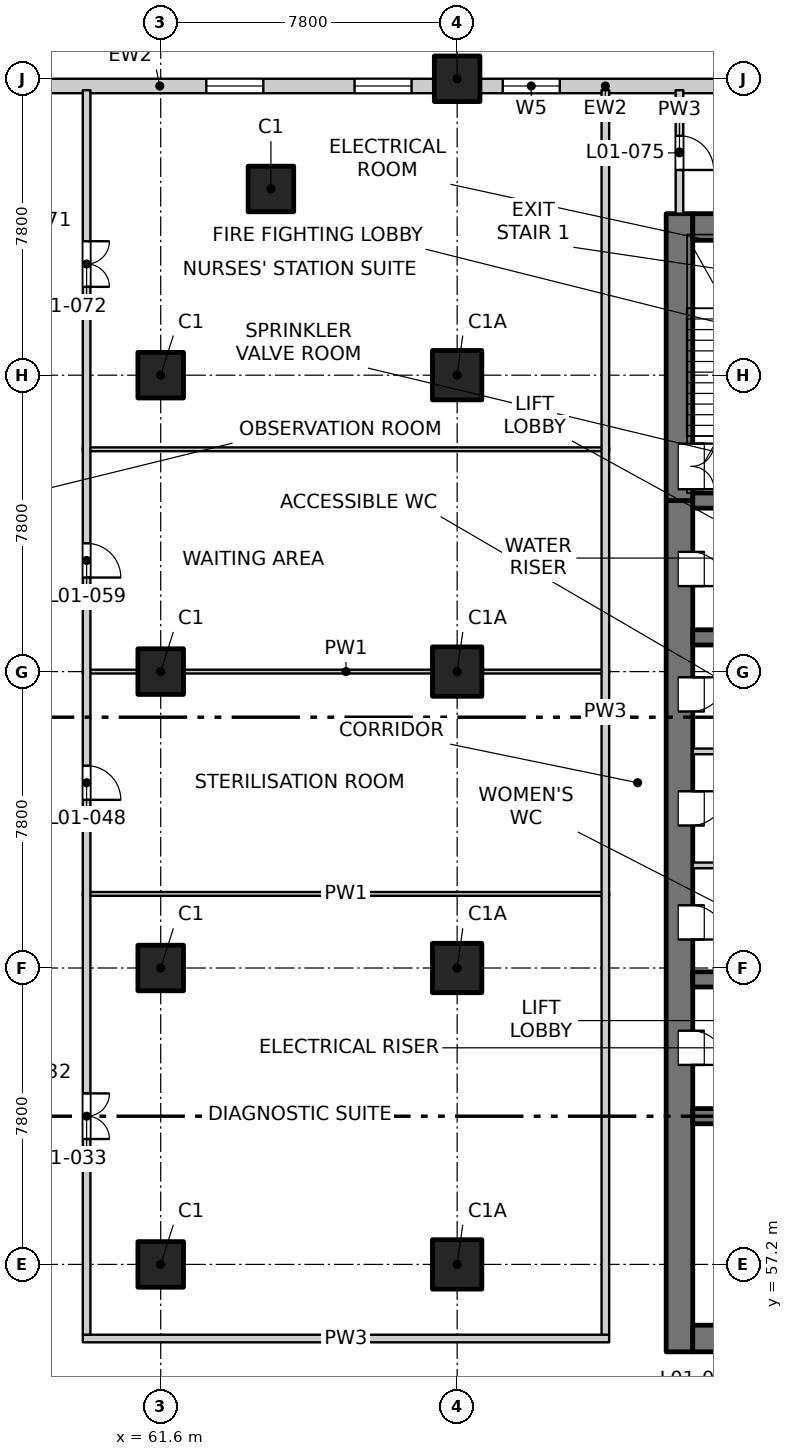
"""IFC4 building model, lengths in metres.
Left out: names, types, materials, properties, quantities, classifications, styles, units other than length and angle.
Written with IfcOpenShell. Run it as: python <this file> out.ifc"""

import sys

from ifc_helpers import new_model, si_unit, direction, frame, frame_2d, origin, origin_2d, place, context, subcontext, project, spatial, rectangle, extrude, element, fill, save


model = new_model("IFC4")
c1 = context("Model", 3, precision=1e-05, world=origin(), true_north=direction((0.0, 1.0)))
c2 = subcontext(c1, "Body", "Model", "MODEL_VIEW")
j1 = project(units=[si_unit("LENGTHUNIT", "METRE"), si_unit("PLANEANGLEUNIT", "RADIAN")], contexts=[c1])
p1 = place(None, origin())
s1 = spatial("IfcSite", under=j1, at=p1, CompositionType="ELEMENT")
p2 = place(p1, origin())
s2 = spatial("IfcBuilding", under=s1, at=p2, CompositionType="ELEMENT")
p3 = place(p2, frame((0.0, 0.0, 6.0)))
s3 = spatial("IfcBuildingStorey", under=s2, at=p3, CompositionType="ELEMENT", Elevation=6.0)
for number, where, z_axis, x_axis in (
    (1, (64.5, 85.5, -0.3), (0.0, 0.0, 1.0), (1.0, 0.0, 0.0)),
    (2, (69.4, 88.4, -0.3), (0.0, 0.0, 1.0), (1.0, 0.0, 0.0)),
    (3, (61.6, 57.2, -0.3), (0.0, 0.0, 1.0), (1.0, 0.0, 0.0)),
    (4, (61.6, 65.0, -0.3), (0.0, 0.0, 1.0), (1.0, 0.0, 0.0)),
    (5, (61.6, 72.8, -0.3), (0.0, 0.0, 1.0), (1.0, 0.0, 0.0)),
    (6, (61.6, 80.6, -0.3), (0.0, 0.0, 1.0), (1.0, 0.0, 0.0)),
):
    element("IfcColumn", number, at=place(p3, frame(where, z_axis=z_axis, x_axis=x_axis)), inside=s3, PredefinedType="COLUMN", context=c2, shape_type="SweptSolid", body=[
        extrude(rectangle(XDim=1.2, YDim=1.2, at=origin_2d()), origin(), (0.0, 0.0, 1.0), 4.5),
    ])
for number, where, z_axis, x_axis in (
    (7, (69.4, 57.2, -0.3), (0.0, 0.0, 1.0), (1.0, 0.0, 0.0)),
    (8, (69.4, 65.0, -0.3), (0.0, 0.0, 1.0), (1.0, 0.0, 0.0)),
    (9, (69.4, 72.8, -0.3), (0.0, 0.0, 1.0), (1.0, 0.0, 0.0)),
    (10, (69.4, 80.6, -0.3), (0.0, 0.0, 1.0), (1.0, 0.0, 0.0)),
):
    element("IfcColumn", number, at=place(p3, frame(where, z_axis=z_axis, x_axis=x_axis)), inside=s3, PredefinedType="COLUMN", context=c2, shape_type="SweptSolid", body=[
        extrude(rectangle(XDim=1.3, YDim=1.3, at=origin_2d()), origin(), (0.0, 0.0, 1.0), 4.5),
    ])
p4 = place(p3, frame((75.25, 54.9, -0.3), z_axis=(0.0, 0.0, 1.0), x_axis=(0.0, 1.0, 0.0)))
e11 = element("IfcWall", 11, at=p4, inside=s3, PredefinedType="SOLIDWALL", context=c2, shape_type="SweptSolid", body=[
    extrude(rectangle(XDim=22.4, YDim=0.7, at=frame_2d((11.2, 0.0))), origin(), (0.0, 0.0, 1.0), 4.5),
])
p5 = place(p4, frame((7.55, 0.0, 0.3)))
e12 = element("IfcOpeningElement", 12, at=p5, cuts=e11, PredefinedType="OPENING", context=c2, shape_type="SweptSolid", body=[
    extrude(rectangle(XDim=0.9, YDim=2.1, at=frame_2d((0.45, 1.05))), frame((0.0, 0.36, 0.0), z_axis=(0.0, -1.0, 0.0), x_axis=(1.0, 0.0, 0.0)), (0.0, 0.0, 1.0), 0.72),
])
p6 = place(p4, frame((10.85, 0.0, 0.3)))
e13 = element("IfcOpeningElement", 13, at=p6, cuts=e11, PredefinedType="OPENING", context=c2, shape_type="SweptSolid", body=[
    extrude(rectangle(XDim=0.9, YDim=2.1, at=frame_2d((0.45, 1.05))), frame((0.0, 0.36, 0.0), z_axis=(0.0, -1.0, 0.0), x_axis=(1.0, 0.0, 0.0)), (0.0, 0.0, 1.0), 0.72),
])
p7 = place(p4, frame((13.85, 0.0, 0.3)))
e14 = element("IfcOpeningElement", 14, at=p7, cuts=e11, PredefinedType="OPENING", context=c2, shape_type="SweptSolid", body=[
    extrude(rectangle(XDim=0.9, YDim=2.1, at=frame_2d((0.45, 1.05))), frame((0.0, 0.36, 0.0), z_axis=(0.0, -1.0, 0.0), x_axis=(1.0, 0.0, 0.0)), (0.0, 0.0, 1.0), 0.72),
])
p8 = place(p4, frame((16.85, 0.0, 0.3)))
e15 = element("IfcOpeningElement", 15, at=p8, cuts=e11, PredefinedType="OPENING", context=c2, shape_type="SweptSolid", body=[
    extrude(rectangle(XDim=0.9, YDim=2.1, at=frame_2d((0.45, 1.05))), frame((0.0, 0.36, 0.0), z_axis=(0.0, -1.0, 0.0), x_axis=(1.0, 0.0, 0.0)), (0.0, 0.0, 1.0), 0.72),
])
p9 = place(p4, frame((20.15, 0.0, 0.3)))
e16 = element("IfcOpeningElement", 16, at=p9, cuts=e11, PredefinedType="OPENING", context=c2, shape_type="SweptSolid", body=[
    extrude(rectangle(XDim=0.9, YDim=2.1, at=frame_2d((0.45, 1.05))), frame((0.0, 0.36, 0.0), z_axis=(0.0, -1.0, 0.0), x_axis=(1.0, 0.0, 0.0)), (0.0, 0.0, 1.0), 0.72),
])
p10 = place(p3, frame((75.25, 77.3, -0.3), z_axis=(0.0, 0.0, 1.0), x_axis=(0.0, 1.0, 0.0)))
e17 = element("IfcWall", 17, at=p10, inside=s3, PredefinedType="SOLIDWALL", context=c2, shape_type="SweptSolid", body=[
    extrude(rectangle(XDim=7.55, YDim=0.7, at=frame_2d((3.775, 0.0))), origin(), (0.0, 0.0, 1.0), 4.5),
])
p11 = place(p10, frame((0.3, 0.0, 0.3)))
e18 = element("IfcOpeningElement", 18, at=p11, cuts=e17, PredefinedType="OPENING", context=c2, shape_type="SweptSolid", body=[
    extrude(rectangle(XDim=1.2, YDim=2.1, at=frame_2d((0.6, 1.05))), frame((0.0, 0.36, 0.0), z_axis=(0.0, -1.0, 0.0), x_axis=(1.0, 0.0, 0.0)), (0.0, 0.0, 1.0), 0.72),
])
p12 = place(p3, frame((75.6, 55.25, -0.3), z_axis=(0.0, 0.0, 1.0), x_axis=(1.0, 0.0, 0.0)))
e19 = element("IfcWall", 19, at=p12, inside=s3, PredefinedType="SOLIDWALL", context=c2, shape_type="SweptSolid", body=[
    extrude(rectangle(XDim=18.8, YDim=0.7, at=frame_2d((9.4, 0.0))), origin(), (0.0, 0.0, 1.0), 4.5),
])
p13 = place(p12, frame((8.65, 0.0, 0.3)))
e20 = element("IfcOpeningElement", 20, at=p13, cuts=e19, PredefinedType="OPENING", context=c2, shape_type="SweptSolid", body=[
    extrude(rectangle(XDim=1.5, YDim=2.1, at=frame_2d((0.75, 1.05))), frame((0.0, 0.36, 0.0), z_axis=(0.0, -1.0, 0.0), x_axis=(1.0, 0.0, 0.0)), (0.0, 0.0, 1.0), 0.72),
])
p14 = place(p3, frame((75.6, 84.5, -0.3), z_axis=(0.0, 0.0, 1.0), x_axis=(1.0, 0.0, 0.0)))
e21 = element("IfcWall", 21, at=p14, inside=s3, PredefinedType="SOLIDWALL", context=c2, shape_type="SweptSolid", body=[
    extrude(rectangle(XDim=18.8, YDim=0.7, at=frame_2d((9.4, 0.0))), origin(), (0.0, 0.0, 1.0), 4.5),
])
for number, where, z_axis, x_axis in (
    (22, (75.6, 61.1, -0.3), (0.0, 0.0, 1.0), (1.0, 0.0, 0.0)),
    (23, (75.6, 64.7, -0.3), (0.0, 0.0, 1.0), (1.0, 0.0, 0.0)),
    (24, (75.6, 73.7, -0.3), (0.0, 0.0, 1.0), (1.0, 0.0, 0.0)),
    (25, (75.6, 77.3, -0.3), (0.0, 0.0, 1.0), (1.0, 0.0, 0.0)),
):
    element("IfcWall", number, at=place(p3, frame(where, z_axis=z_axis, x_axis=x_axis)), inside=s3, PredefinedType="SOLIDWALL", context=c2, shape_type="SweptSolid", body=[
        extrude(rectangle(XDim=3.65, YDim=0.4, at=frame_2d((1.825, 0.0))), origin(), (0.0, 0.0, 1.0), 4.5),
    ])
p15 = place(p3, frame((54.35, 88.21, 0.0), z_axis=(0.0, 0.0, 1.0), x_axis=(1.0, 0.0, 0.0)))
e26 = element("IfcWall", 26, at=p15, inside=s3, PredefinedType="SOLIDWALL", context=c2, shape_type="SweptSolid", body=[
    extrude(rectangle(XDim=14.45, YDim=0.38, at=frame_2d((7.225, 0.0))), origin(), (0.0, 0.0, 1.0), 4.2),
])
p16 = place(p15, frame((0.65, 0.0, 0.9)))
e27 = element("IfcOpeningElement", 27, at=p16, cuts=e26, PredefinedType="OPENING", context=c2, shape_type="SweptSolid", body=[
    extrude(rectangle(XDim=1.5, YDim=1.5, at=frame_2d((0.75, 0.75))), frame((0.0, 0.2, 0.0), z_axis=(0.0, -1.0, 0.0), x_axis=(1.0, 0.0, 0.0)), (0.0, 0.0, 1.0), 0.4),
])
p17 = place(p15, frame((8.45, 0.0, 0.9)))
e28 = element("IfcOpeningElement", 28, at=p17, cuts=e26, PredefinedType="OPENING", context=c2, shape_type="SweptSolid", body=[
    extrude(rectangle(XDim=1.5, YDim=1.5, at=frame_2d((0.75, 0.75))), frame((0.0, 0.2, 0.0), z_axis=(0.0, -1.0, 0.0), x_axis=(1.0, 0.0, 0.0)), (0.0, 0.0, 1.0), 0.4),
])
p18 = place(p15, frame((12.35, 0.0, 0.9)))
e29 = element("IfcOpeningElement", 29, at=p18, cuts=e26, PredefinedType="OPENING", context=c2, shape_type="SweptSolid", body=[
    extrude(rectangle(XDim=1.5, YDim=1.5, at=frame_2d((0.75, 0.75))), frame((0.0, 0.2, 0.0), z_axis=(0.0, -1.0, 0.0), x_axis=(1.0, 0.0, 0.0)), (0.0, 0.0, 1.0), 0.4),
])
p19 = place(p3, frame((70.0, 88.21, 0.0), z_axis=(0.0, 0.0, 1.0), x_axis=(1.0, 0.0, 0.0)))
e30 = element("IfcWall", 30, at=p19, inside=s3, PredefinedType="SOLIDWALL", context=c2, shape_type="SweptSolid", body=[
    extrude(rectangle(XDim=6.6, YDim=0.38, at=frame_2d((3.3, 0.0))), origin(), (0.0, 0.0, 1.0), 4.2),
])
p20 = place(p19, frame((0.6, 0.0, 0.9)))
e31 = element("IfcOpeningElement", 31, at=p20, cuts=e30, PredefinedType="OPENING", context=c2, shape_type="SweptSolid", body=[
    extrude(rectangle(XDim=1.5, YDim=1.5, at=frame_2d((0.75, 0.75))), frame((0.0, 0.2, 0.0), z_axis=(0.0, -1.0, 0.0), x_axis=(1.0, 0.0, 0.0)), (0.0, 0.0, 1.0), 0.4),
])
p21 = place(p3, frame((59.55, 55.25, 0.0), z_axis=(0.0, 0.0, 1.0), x_axis=(1.0, 0.0, 0.0)))
e32 = element("IfcWall", 32, at=p21, inside=s3, PredefinedType="PARTITIONING", context=c2, shape_type="SweptSolid", body=[
    extrude(rectangle(XDim=13.85, YDim=0.2, at=frame_2d((6.925, 0.0))), origin(), (0.0, 0.0, 1.0), 4.2),
])
p22 = place(p3, frame((59.55, 66.95, 0.0), z_axis=(0.0, 0.0, 1.0), x_axis=(1.0, 0.0, 0.0)))
e33 = element("IfcWall", 33, at=p22, inside=s3, PredefinedType="PARTITIONING", context=c2, shape_type="SweptSolid", body=[
    extrude(rectangle(XDim=13.85, YDim=0.1, at=frame_2d((6.925, 0.0))), origin(), (0.0, 0.0, 1.0), 4.2),
])
for number, where, z_axis, x_axis in (
    (34, (75.6, 67.7, 0.0), (0.0, 0.0, 1.0), (1.0, 0.0, 0.0)),
    (35, (75.6, 70.7, 0.0), (0.0, 0.0, 1.0), (1.0, 0.0, 0.0)),
):
    element("IfcWall", number, at=place(p3, frame(where, z_axis=z_axis, x_axis=x_axis)), inside=s3, PredefinedType="PARTITIONING", context=c2, shape_type="SweptSolid", body=[
        extrude(rectangle(XDim=3.65, YDim=0.15, at=frame_2d((1.825, 0.0))), origin(), (0.0, 0.0, 1.0), 4.2),
    ])
for number, where, z_axis, x_axis in (
    (36, (59.55, 72.8, 0.0), (0.0, 0.0, 1.0), (1.0, 0.0, 0.0)),
    (37, (59.55, 78.65, 0.0), (0.0, 0.0, 1.0), (1.0, 0.0, 0.0)),
):
    element("IfcWall", number, at=place(p3, frame(where, z_axis=z_axis, x_axis=x_axis)), inside=s3, PredefinedType="PARTITIONING", context=c2, shape_type="SweptSolid", body=[
        extrude(rectangle(XDim=13.85, YDim=0.1, at=frame_2d((6.925, 0.0))), origin(), (0.0, 0.0, 1.0), 4.2),
    ])
p23 = place(p3, frame((59.65, 55.35, 0.0), z_axis=(0.0, 0.0, 1.0), x_axis=(0.0, 1.0, 0.0)))
e38 = element("IfcWall", 38, at=p23, inside=s3, PredefinedType="PARTITIONING", context=c2, shape_type="SweptSolid", body=[
    extrude(rectangle(XDim=32.75, YDim=0.2, at=frame_2d((16.375, 0.0))), origin(), (0.0, 0.0, 1.0), 4.2),
])
p24 = place(p23, frame((5.15, 0.0, 0.0)))
e39 = element("IfcOpeningElement", 39, at=p24, cuts=e38, PredefinedType="OPENING", context=c2, shape_type="SweptSolid", body=[
    extrude(rectangle(XDim=1.2, YDim=2.1, at=frame_2d((0.6, 1.05))), frame((0.0, 0.11, 0.0), z_axis=(0.0, -1.0, 0.0), x_axis=(1.0, 0.0, 0.0)), (0.0, 0.0, 1.0), 0.22),
])
p25 = place(p23, frame((14.075, 0.0, 0.0)))
e40 = element("IfcOpeningElement", 40, at=p25, cuts=e38, PredefinedType="OPENING", context=c2, shape_type="SweptSolid", body=[
    extrude(rectangle(XDim=0.9, YDim=2.1, at=frame_2d((0.45, 1.05))), frame((0.0, 0.11, 0.0), z_axis=(0.0, -1.0, 0.0), x_axis=(1.0, 0.0, 0.0)), (0.0, 0.0, 1.0), 0.22),
])
p26 = place(p23, frame((19.925, 0.0, 0.0)))
e41 = element("IfcOpeningElement", 41, at=p26, cuts=e38, PredefinedType="OPENING", context=c2, shape_type="SweptSolid", body=[
    extrude(rectangle(XDim=0.9, YDim=2.1, at=frame_2d((0.45, 1.05))), frame((0.0, 0.11, 0.0), z_axis=(0.0, -1.0, 0.0), x_axis=(1.0, 0.0, 0.0)), (0.0, 0.0, 1.0), 0.22),
])
p27 = place(p23, frame((27.575, 0.0, 0.0)))
e42 = element("IfcOpeningElement", 42, at=p27, cuts=e38, PredefinedType="OPENING", context=c2, shape_type="SweptSolid", body=[
    extrude(rectangle(XDim=1.2, YDim=2.1, at=frame_2d((0.6, 1.05))), frame((0.0, 0.11, 0.0), z_axis=(0.0, -1.0, 0.0), x_axis=(1.0, 0.0, 0.0)), (0.0, 0.0, 1.0), 0.22),
])
p28 = place(p3, frame((73.3, 55.35, 0.0), z_axis=(0.0, 0.0, 1.0), x_axis=(0.0, 1.0, 0.0)))
e43 = element("IfcWall", 43, at=p28, inside=s3, PredefinedType="PARTITIONING", context=c2, shape_type="SweptSolid", body=[
    extrude(rectangle(XDim=32.75, YDim=0.2, at=frame_2d((16.375, 0.0))), origin(), (0.0, 0.0, 1.0), 4.2),
])
p29 = place(p3, frame((75.25, 84.85, 0.0), z_axis=(0.0, 0.0, 1.0), x_axis=(0.0, 1.0, 0.0)))
e44 = element("IfcWall", 44, at=p29, inside=s3, PredefinedType="PARTITIONING", context=c2, shape_type="SweptSolid", body=[
    extrude(rectangle(XDim=3.25, YDim=0.2, at=frame_2d((1.625, 0.0))), origin(), (0.0, 0.0, 1.0), 4.2),
])
p30 = place(p29, frame((1.15, 0.0, 0.0)))
e45 = element("IfcOpeningElement", 45, at=p30, cuts=e44, PredefinedType="OPENING", context=c2, shape_type="SweptSolid", body=[
    extrude(rectangle(XDim=0.9, YDim=2.1, at=frame_2d((0.45, 1.05))), frame((0.0, 0.11, 0.0), z_axis=(0.0, -1.0, 0.0), x_axis=(1.0, 0.0, 0.0)), (0.0, 0.0, 1.0), 0.22),
])
p31 = place(p17, origin())
e46 = element("IfcWindow", 46, at=p31, inside=s3, PartitioningType="SINGLE_PANEL", PredefinedType="WINDOW", context=c2, shape_type="SweptSolid", body=[
    extrude(rectangle(XDim=1.5, YDim=1.5, at=frame_2d((0.75, 0.75))), frame((0.0, 0.03, 0.0), z_axis=(0.0, -1.0, 0.0), x_axis=(1.0, 0.0, 0.0)), (0.0, 0.0, 1.0), 0.06),
])
fill(e28, e46)
p32 = place(p18, origin())
e47 = element("IfcWindow", 47, at=p32, inside=s3, PartitioningType="SINGLE_PANEL", PredefinedType="WINDOW", context=c2, shape_type="SweptSolid", body=[
    extrude(rectangle(XDim=1.5, YDim=1.5, at=frame_2d((0.75, 0.75))), frame((0.0, 0.03, 0.0), z_axis=(0.0, -1.0, 0.0), x_axis=(1.0, 0.0, 0.0)), (0.0, 0.0, 1.0), 0.06),
])
fill(e29, e47)
p33 = place(p20, origin())
e48 = element("IfcWindow", 48, at=p33, inside=s3, PartitioningType="SINGLE_PANEL", PredefinedType="WINDOW", context=c2, shape_type="SweptSolid", body=[
    extrude(rectangle(XDim=1.5, YDim=1.5, at=frame_2d((0.75, 0.75))), frame((0.0, 0.03, 0.0), z_axis=(0.0, -1.0, 0.0), x_axis=(1.0, 0.0, 0.0)), (0.0, 0.0, 1.0), 0.06),
])
fill(e31, e48)
p34 = place(p24, origin())
e49 = element("IfcDoor", 49, at=p34, inside=s3, OperationType="DOUBLE_DOOR_SINGLE_SWING", PredefinedType="DOOR", context=c2, shape_type="SweptSolid", body=[
    extrude(rectangle(XDim=1.2, YDim=2.1, at=frame_2d((0.6, 1.05))), frame((0.0, 0.025, 0.0), z_axis=(0.0, -1.0, 0.0), x_axis=(1.0, 0.0, 0.0)), (0.0, 0.0, 1.0), 0.05),
])
fill(e39, e49)
p35 = place(p5, origin())
e50 = element("IfcDoor", 50, at=p35, inside=s3, OperationType="SINGLE_SWING_RIGHT", PredefinedType="DOOR", context=c2, shape_type="SweptSolid", body=[
    extrude(rectangle(XDim=0.9, YDim=2.1, at=frame_2d((0.45, 1.05))), frame((0.0, -0.285, 0.0), z_axis=(0.0, -1.0, 0.0), x_axis=(1.0, 0.0, 0.0)), (0.0, 0.0, 1.0), 0.05),
])
fill(e12, e50)
p36 = place(p6, origin())
e51 = element("IfcDoor", 51, at=p36, inside=s3, OperationType="SINGLE_SWING_RIGHT", PredefinedType="DOOR", context=c2, shape_type="SweptSolid", body=[
    extrude(rectangle(XDim=0.9, YDim=2.1, at=frame_2d((0.45, 1.05))), frame((0.0, -0.285, 0.0), z_axis=(0.0, -1.0, 0.0), x_axis=(1.0, 0.0, 0.0)), (0.0, 0.0, 1.0), 0.05),
])
fill(e13, e51)
p37 = place(p7, origin())
e52 = element("IfcDoor", 52, at=p37, inside=s3, OperationType="SINGLE_SWING_LEFT", PredefinedType="DOOR", context=c2, shape_type="SweptSolid", body=[
    extrude(rectangle(XDim=0.9, YDim=2.1, at=frame_2d((0.45, 1.05))), frame((0.0, -0.285, 0.0), z_axis=(0.0, -1.0, 0.0), x_axis=(1.0, 0.0, 0.0)), (0.0, 0.0, 1.0), 0.05),
])
fill(e14, e52)
p38 = place(p25, origin())
e53 = element("IfcDoor", 53, at=p38, inside=s3, OperationType="SINGLE_SWING_RIGHT", PredefinedType="DOOR", context=c2, shape_type="SweptSolid", body=[
    extrude(rectangle(XDim=0.9, YDim=2.1, at=frame_2d((0.45, 1.05))), frame((0.0, 0.025, 0.0), z_axis=(0.0, -1.0, 0.0), x_axis=(1.0, 0.0, 0.0)), (0.0, 0.0, 1.0), 0.05),
])
fill(e40, e53)
p39 = place(p8, origin())
e54 = element("IfcDoor", 54, at=p39, inside=s3, OperationType="SINGLE_SWING_LEFT", PredefinedType="DOOR", context=c2, shape_type="SweptSolid", body=[
    extrude(rectangle(XDim=0.9, YDim=2.1, at=frame_2d((0.45, 1.05))), frame((0.0, -0.285, 0.0), z_axis=(0.0, -1.0, 0.0), x_axis=(1.0, 0.0, 0.0)), (0.0, 0.0, 1.0), 0.05),
])
fill(e15, e54)
p40 = place(p9, origin())
e55 = element("IfcDoor", 55, at=p40, inside=s3, OperationType="SINGLE_SWING_RIGHT", PredefinedType="DOOR", context=c2, shape_type="SweptSolid", body=[
    extrude(rectangle(XDim=0.9, YDim=2.1, at=frame_2d((0.45, 1.05))), frame((0.0, -0.285, 0.0), z_axis=(0.0, -1.0, 0.0), x_axis=(1.0, 0.0, 0.0)), (0.0, 0.0, 1.0), 0.05),
])
fill(e16, e55)
p41 = place(p26, origin())
e56 = element("IfcDoor", 56, at=p41, inside=s3, OperationType="SINGLE_SWING_RIGHT", PredefinedType="DOOR", context=c2, shape_type="SweptSolid", body=[
    extrude(rectangle(XDim=0.9, YDim=2.1, at=frame_2d((0.45, 1.05))), frame((0.0, 0.025, 0.0), z_axis=(0.0, -1.0, 0.0), x_axis=(1.0, 0.0, 0.0)), (0.0, 0.0, 1.0), 0.05),
])
fill(e41, e56)
p42 = place(p11, origin())
e57 = element("IfcDoor", 57, at=p42, inside=s3, OperationType="DOUBLE_DOOR_SINGLE_SWING", PredefinedType="DOOR", context=c2, shape_type="SweptSolid", body=[
    extrude(rectangle(XDim=1.2, YDim=2.1, at=frame_2d((0.6, 1.05))), frame((0.0, -0.285, 0.0), z_axis=(0.0, -1.0, 0.0), x_axis=(1.0, 0.0, 0.0)), (0.0, 0.0, 1.0), 0.05),
])
fill(e18, e57)
p43 = place(p27, origin())
e58 = element("IfcDoor", 58, at=p43, inside=s3, OperationType="DOUBLE_DOOR_SINGLE_SWING", PredefinedType="DOOR", context=c2, shape_type="SweptSolid", body=[
    extrude(rectangle(XDim=1.2, YDim=2.1, at=frame_2d((0.6, 1.05))), frame((0.0, 0.025, 0.0), z_axis=(0.0, -1.0, 0.0), x_axis=(1.0, 0.0, 0.0)), (0.0, 0.0, 1.0), 0.05),
])
fill(e42, e58)
p44 = place(p30, origin())
e59 = element("IfcDoor", 59, at=p44, inside=s3, OperationType="SINGLE_SWING_RIGHT", PredefinedType="DOOR", context=c2, shape_type="SweptSolid", body=[
    extrude(rectangle(XDim=0.9, YDim=2.1, at=frame_2d((0.45, 1.05))), frame((0.0, 0.025, 0.0), z_axis=(0.0, -1.0, 0.0), x_axis=(1.0, 0.0, 0.0)), (0.0, 0.0, 1.0), 0.05),
])
fill(e45, e59)
save(model, sys.argv[1])
